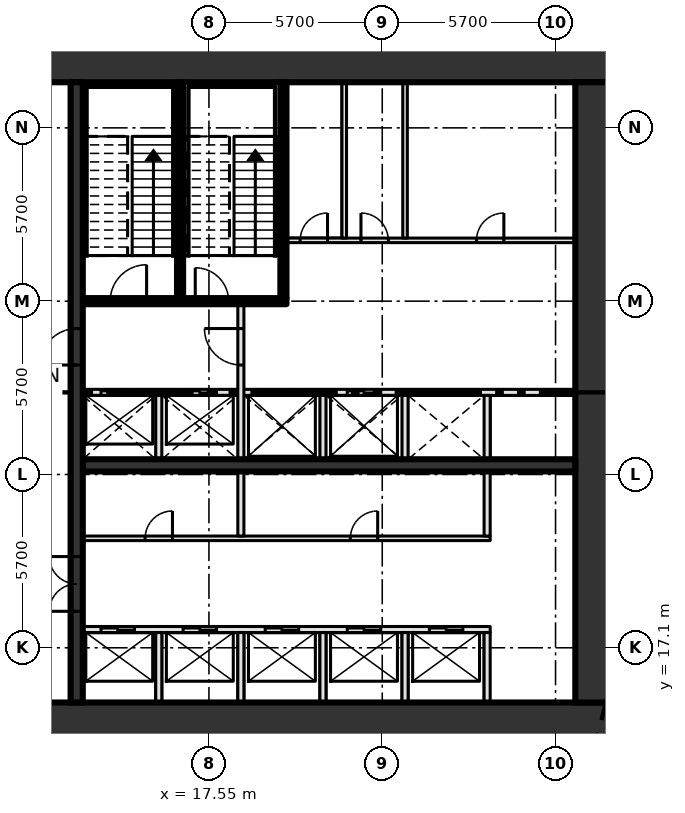
"""IFC4 building model, lengths in metres.
Left out: names, types, materials, properties, quantities, classifications, styles, units other than length and angle.
Written with IfcOpenShell. Run it as: python <this file> out.ifc"""

import sys

from ifc_helpers import new_model, si_unit, direction, frame, frame_2d, origin, place, context, subcontext, project, spatial, rectangle, extrude, element, fill, save


model = new_model("IFC4")
c1 = context("Model", 3, precision=1e-05, world=origin(), true_north=direction((0.0, 1.0)))
c2 = subcontext(c1, "Body", "Model", "MODEL_VIEW")
j1 = project(units=[si_unit("LENGTHUNIT", "METRE"), si_unit("PLANEANGLEUNIT", "RADIAN")], contexts=[c1])
p1 = place(None, origin())
s1 = spatial("IfcSite", under=j1, at=p1, CompositionType="ELEMENT")
p2 = place(p1, origin())
s2 = spatial("IfcBuilding", under=s1, at=p2, CompositionType="ELEMENT")
p3 = place(p2, frame((0.0, 0.0, 7.2)))
s3 = spatial("IfcBuildingStorey", under=s2, at=p3, CompositionType="ELEMENT", Elevation=7.2)
p4 = place(p3, frame((8.0, 14.7, -0.45), z_axis=(0.0, 0.0, 1.0), x_axis=(1.0, 0.0, 0.0)))
e1 = element("IfcWall", 1, at=p4, inside=s3, PredefinedType="SHEAR", context=c2, shape_type="SweptSolid", body=[
    extrude(rectangle(XDim=22.8, YDim=1.2, at=frame_2d((11.4, 0.0))), origin(), (0.0, 0.0, 1.0), 5.4),
])
p5 = place(p4, frame((2.3, 0.0, 0.45)))
e2 = element("IfcOpeningElement", 2, at=p5, cuts=e1, PredefinedType="OPENING", context=c2, shape_type="SweptSolid", body=[
    extrude(rectangle(XDim=1.8, YDim=2.1, at=frame_2d((0.9, 1.05))), frame((0.0, 0.61, 0.0), z_axis=(0.0, -1.0, 0.0), x_axis=(1.0, 0.0, 0.0)), (0.0, 0.0, 1.0), 1.22),
])
p6 = place(p3, frame((8.0, 36.3, -0.45), z_axis=(0.0, 0.0, 1.0), x_axis=(1.0, 0.0, 0.0)))
e3 = element("IfcWall", 3, at=p6, inside=s3, PredefinedType="SHEAR", context=c2, shape_type="SweptSolid", body=[
    extrude(rectangle(XDim=22.8, YDim=1.2, at=frame_2d((11.4, 0.0))), origin(), (0.0, 0.0, 1.0), 5.4),
])
p7 = place(p6, frame((2.3, 0.0, 0.45)))
e4 = element("IfcOpeningElement", 4, at=p7, cuts=e3, PredefinedType="OPENING", context=c2, shape_type="SweptSolid", body=[
    extrude(rectangle(XDim=1.8, YDim=2.1, at=frame_2d((0.9, 1.05))), frame((0.0, 0.61, 0.0), z_axis=(0.0, -1.0, 0.0), x_axis=(1.0, 0.0, 0.0)), (0.0, 0.0, 1.0), 1.22),
])
p8 = place(p3, frame((30.2, 15.3, -0.45), z_axis=(0.0, 0.0, 1.0), x_axis=(0.0, 1.0, 0.0)))
e5 = element("IfcWall", 5, at=p8, inside=s3, PredefinedType="SHEAR", context=c2, shape_type="SweptSolid", body=[
    extrude(rectangle(XDim=20.4, YDim=1.2, at=frame_2d((10.2, 0.0))), origin(), (0.0, 0.0, 1.0), 5.4),
])
p9 = place(p3, frame((13.4, 17.7, 0.0), z_axis=(0.0, 0.0, 1.0), x_axis=(1.0, 0.0, 0.0)))
e6 = element("IfcWall", 6, at=p9, inside=s3, PredefinedType="SOLIDWALL", context=c2, shape_type="SweptSolid", body=[
    extrude(rectangle(XDim=13.4, YDim=0.2, at=frame_2d((6.7, 0.0))), origin(), (0.0, 0.0, 1.0), 4.95),
])
p10 = place(p9, frame((0.6, 0.0, 0.0)))
e7 = element("IfcOpeningElement", 7, at=p10, cuts=e6, PredefinedType="OPENING", context=c2, shape_type="SweptSolid", body=[
    extrude(rectangle(XDim=1.1, YDim=2.1, at=frame_2d((0.55, 1.05))), frame((0.0, 0.11, 0.0), z_axis=(0.0, -1.0, 0.0), x_axis=(1.0, 0.0, 0.0)), (0.0, 0.0, 1.0), 0.22),
])
p11 = place(p9, frame((3.3, 0.0, 0.0)))
e8 = element("IfcOpeningElement", 8, at=p11, cuts=e6, PredefinedType="OPENING", context=c2, shape_type="SweptSolid", body=[
    extrude(rectangle(XDim=1.1, YDim=2.1, at=frame_2d((0.55, 1.05))), frame((0.0, 0.11, 0.0), z_axis=(0.0, -1.0, 0.0), x_axis=(1.0, 0.0, 0.0)), (0.0, 0.0, 1.0), 0.22),
])
p12 = place(p9, frame((6.0, 0.0, 0.0)))
e9 = element("IfcOpeningElement", 9, at=p12, cuts=e6, PredefinedType="OPENING", context=c2, shape_type="SweptSolid", body=[
    extrude(rectangle(XDim=1.1, YDim=2.1, at=frame_2d((0.55, 1.05))), frame((0.0, 0.11, 0.0), z_axis=(0.0, -1.0, 0.0), x_axis=(1.0, 0.0, 0.0)), (0.0, 0.0, 1.0), 0.22),
])
p13 = place(p9, frame((8.7, 0.0, 0.0)))
e10 = element("IfcOpeningElement", 10, at=p13, cuts=e6, PredefinedType="OPENING", context=c2, shape_type="SweptSolid", body=[
    extrude(rectangle(XDim=1.1, YDim=2.1, at=frame_2d((0.55, 1.05))), frame((0.0, 0.11, 0.0), z_axis=(0.0, -1.0, 0.0), x_axis=(1.0, 0.0, 0.0)), (0.0, 0.0, 1.0), 0.22),
])
p14 = place(p9, frame((11.4, 0.0, 0.0)))
e11 = element("IfcOpeningElement", 11, at=p14, cuts=e6, PredefinedType="OPENING", context=c2, shape_type="SweptSolid", body=[
    extrude(rectangle(XDim=1.1, YDim=2.1, at=frame_2d((0.55, 1.05))), frame((0.0, 0.11, 0.0), z_axis=(0.0, -1.0, 0.0), x_axis=(1.0, 0.0, 0.0)), (0.0, 0.0, 1.0), 0.22),
])
p15 = place(p3, frame((13.4, 20.7, 0.0), z_axis=(0.0, 0.0, 1.0), x_axis=(1.0, 0.0, 0.0)))
e12 = element("IfcWall", 12, at=p15, inside=s3, PredefinedType="PARTITIONING", context=c2, shape_type="SweptSolid", body=[
    extrude(rectangle(XDim=13.4, YDim=0.15, at=frame_2d((6.7, 0.0))), origin(), (0.0, 0.0, 1.0), 4.95),
])
p16 = place(p15, frame((2.05, 0.0, 0.0)))
e13 = element("IfcOpeningElement", 13, at=p16, cuts=e12, PredefinedType="OPENING", context=c2, shape_type="SweptSolid", body=[
    extrude(rectangle(XDim=0.9, YDim=2.1, at=frame_2d((0.45, 1.05))), frame((0.0, 0.085, 0.0), z_axis=(0.0, -1.0, 0.0), x_axis=(1.0, 0.0, 0.0)), (0.0, 0.0, 1.0), 0.17),
])
p17 = place(p15, frame((8.8, 0.0, 0.0)))
e14 = element("IfcOpeningElement", 14, at=p17, cuts=e12, PredefinedType="OPENING", context=c2, shape_type="SweptSolid", body=[
    extrude(rectangle(XDim=0.9, YDim=2.1, at=frame_2d((0.45, 1.05))), frame((0.0, 0.085, 0.0), z_axis=(0.0, -1.0, 0.0), x_axis=(1.0, 0.0, 0.0)), (0.0, 0.0, 1.0), 0.17),
])
p18 = place(p3, frame((13.4, 23.1, 0.0), z_axis=(0.0, 0.0, 1.0), x_axis=(1.0, 0.0, 0.0)))
e15 = element("IfcWall", 15, at=p18, inside=s3, PredefinedType="SHEAR", context=c2, shape_type="SweptSolid", body=[
    extrude(rectangle(XDim=16.2, YDim=0.4, at=frame_2d((8.1, 0.0))), origin(), (0.0, 0.0, 1.0), 4.95),
])
p19 = place(p3, frame((13.4, 25.5, 0.0), z_axis=(0.0, 0.0, 1.0), x_axis=(1.0, 0.0, 0.0)))
e16 = element("IfcWall", 16, at=p19, inside=s3, PredefinedType="SOLIDWALL", context=c2, shape_type="SweptSolid", body=[
    extrude(rectangle(XDim=16.2, YDim=0.2, at=frame_2d((8.1, 0.0))), origin(), (0.0, 0.0, 1.0), 4.95),
])
p20 = place(p19, frame((0.6, 0.0, 0.0)))
e17 = element("IfcOpeningElement", 17, at=p20, cuts=e16, PredefinedType="OPENING", context=c2, shape_type="SweptSolid", body=[
    extrude(rectangle(XDim=1.1, YDim=2.1, at=frame_2d((0.55, 1.05))), frame((0.0, 0.11, 0.0), z_axis=(0.0, -1.0, 0.0), x_axis=(1.0, 0.0, 0.0)), (0.0, 0.0, 1.0), 0.22),
])
p21 = place(p19, frame((3.3, 0.0, 0.0)))
e18 = element("IfcOpeningElement", 18, at=p21, cuts=e16, PredefinedType="OPENING", context=c2, shape_type="SweptSolid", body=[
    extrude(rectangle(XDim=1.1, YDim=2.1, at=frame_2d((0.55, 1.05))), frame((0.0, 0.11, 0.0), z_axis=(0.0, -1.0, 0.0), x_axis=(1.0, 0.0, 0.0)), (0.0, 0.0, 1.0), 0.22),
])
p22 = place(p19, frame((6.0, 0.0, 0.0)))
e19 = element("IfcOpeningElement", 19, at=p22, cuts=e16, PredefinedType="OPENING", context=c2, shape_type="SweptSolid", body=[
    extrude(rectangle(XDim=1.1, YDim=2.1, at=frame_2d((0.55, 1.05))), frame((0.0, 0.11, 0.0), z_axis=(0.0, -1.0, 0.0), x_axis=(1.0, 0.0, 0.0)), (0.0, 0.0, 1.0), 0.22),
])
p23 = place(p19, frame((8.7, 0.0, 0.0)))
e20 = element("IfcOpeningElement", 20, at=p23, cuts=e16, PredefinedType="OPENING", context=c2, shape_type="SweptSolid", body=[
    extrude(rectangle(XDim=1.1, YDim=2.1, at=frame_2d((0.55, 1.05))), frame((0.0, 0.11, 0.0), z_axis=(0.0, -1.0, 0.0), x_axis=(1.0, 0.0, 0.0)), (0.0, 0.0, 1.0), 0.22),
])
p24 = place(p3, frame((13.4, 28.5, 0.0), z_axis=(0.0, 0.0, 1.0), x_axis=(1.0, 0.0, 0.0)))
e21 = element("IfcWall", 21, at=p24, inside=s3, PredefinedType="SOLIDWALL", context=c2, shape_type="SweptSolid", body=[
    extrude(rectangle(XDim=6.7, YDim=0.2, at=frame_2d((3.35, 0.0))), origin(), (0.0, 0.0, 1.0), 4.95),
])
p25 = place(p24, frame((0.9, 0.0, 0.0)))
e22 = element("IfcOpeningElement", 22, at=p25, cuts=e21, PredefinedType="OPENING", context=c2, shape_type="SweptSolid", body=[
    extrude(rectangle(XDim=1.2, YDim=2.1, at=frame_2d((0.6, 1.05))), frame((0.0, 0.11, 0.0), z_axis=(0.0, -1.0, 0.0), x_axis=(1.0, 0.0, 0.0)), (0.0, 0.0, 1.0), 0.22),
])
p26 = place(p24, frame((3.7, 0.0, 0.0)))
e23 = element("IfcOpeningElement", 23, at=p26, cuts=e21, PredefinedType="OPENING", context=c2, shape_type="SweptSolid", body=[
    extrude(rectangle(XDim=1.1, YDim=2.1, at=frame_2d((0.55, 1.05))), frame((0.0, 0.11, 0.0), z_axis=(0.0, -1.0, 0.0), x_axis=(1.0, 0.0, 0.0)), (0.0, 0.0, 1.0), 0.22),
])
p27 = place(p3, frame((20.1, 30.5, 0.0), z_axis=(0.0, 0.0, 1.0), x_axis=(1.0, 0.0, 0.0)))
e24 = element("IfcWall", 24, at=p27, inside=s3, PredefinedType="PARTITIONING", context=c2, shape_type="SweptSolid", body=[
    extrude(rectangle(XDim=9.5, YDim=0.15, at=frame_2d((4.75, 0.0))), origin(), (0.0, 0.0, 1.0), 4.95),
])
p28 = place(p27, frame((0.45, 0.0, 0.0)))
e25 = element("IfcOpeningElement", 25, at=p28, cuts=e24, PredefinedType="OPENING", context=c2, shape_type="SweptSolid", body=[
    extrude(rectangle(XDim=0.9, YDim=2.1, at=frame_2d((0.45, 1.05))), frame((0.0, 0.085, 0.0), z_axis=(0.0, -1.0, 0.0), x_axis=(1.0, 0.0, 0.0)), (0.0, 0.0, 1.0), 0.17),
])
p29 = place(p27, frame((2.45, 0.0, 0.0)))
e26 = element("IfcOpeningElement", 26, at=p29, cuts=e24, PredefinedType="OPENING", context=c2, shape_type="SweptSolid", body=[
    extrude(rectangle(XDim=0.9, YDim=2.1, at=frame_2d((0.45, 1.05))), frame((0.0, 0.085, 0.0), z_axis=(0.0, -1.0, 0.0), x_axis=(1.0, 0.0, 0.0)), (0.0, 0.0, 1.0), 0.17),
])
p30 = place(p27, frame((6.25, 0.0, 0.0)))
e27 = element("IfcOpeningElement", 27, at=p30, cuts=e24, PredefinedType="OPENING", context=c2, shape_type="SweptSolid", body=[
    extrude(rectangle(XDim=0.9, YDim=2.1, at=frame_2d((0.45, 1.05))), frame((0.0, 0.085, 0.0), z_axis=(0.0, -1.0, 0.0), x_axis=(1.0, 0.0, 0.0)), (0.0, 0.0, 1.0), 0.17),
])
p31 = place(p3, frame((13.2, 15.3, 0.0), z_axis=(0.0, 0.0, 1.0), x_axis=(0.0, 1.0, 0.0)))
e28 = element("IfcWall", 28, at=p31, inside=s3, PredefinedType="SHEAR", context=c2, shape_type="SweptSolid", body=[
    extrude(rectangle(XDim=20.4, YDim=0.4, at=frame_2d((10.2, 0.0))), origin(), (0.0, 0.0, 1.0), 4.95),
])
p32 = place(p31, frame((3.0, 0.0, 0.0)))
e29 = element("IfcOpeningElement", 29, at=p32, cuts=e28, PredefinedType="OPENING", context=c2, shape_type="SweptSolid", body=[
    extrude(rectangle(XDim=1.8, YDim=2.1, at=frame_2d((0.9, 1.05))), frame((0.0, 0.21, 0.0), z_axis=(0.0, -1.0, 0.0), x_axis=(1.0, 0.0, 0.0)), (0.0, 0.0, 1.0), 0.42),
])
p33 = place(p31, frame((11.1, 0.0, 0.0)))
e30 = element("IfcOpeningElement", 30, at=p33, cuts=e28, PredefinedType="OPENING", context=c2, shape_type="SweptSolid", body=[
    extrude(rectangle(XDim=1.2, YDim=2.1, at=frame_2d((0.6, 1.05))), frame((0.0, 0.21, 0.0), z_axis=(0.0, -1.0, 0.0), x_axis=(1.0, 0.0, 0.0)), (0.0, 0.0, 1.0), 0.42),
])
p34 = place(p3, frame((15.9, 15.3, 0.0), z_axis=(0.0, 0.0, 1.0), x_axis=(0.0, 1.0, 0.0)))
e31 = element("IfcWall", 31, at=p34, inside=s3, PredefinedType="SOLIDWALL", context=c2, shape_type="SweptSolid", body=[
    extrude(rectangle(XDim=2.3, YDim=0.2, at=frame_2d((1.15, 0.0))), origin(), (0.0, 0.0, 1.0), 4.95),
])
p35 = place(p3, frame((15.9, 23.3, 0.0), z_axis=(0.0, 0.0, 1.0), x_axis=(0.0, 1.0, 0.0)))
e32 = element("IfcWall", 32, at=p35, inside=s3, PredefinedType="SOLIDWALL", context=c2, shape_type="SweptSolid", body=[
    extrude(rectangle(XDim=2.1, YDim=0.2, at=frame_2d((1.05, 0.0))), origin(), (0.0, 0.0, 1.0), 4.95),
])
p36 = place(p3, frame((16.6, 28.6, 0.0), z_axis=(0.0, 0.0, 1.0), x_axis=(0.0, 1.0, 0.0)))
e33 = element("IfcWall", 33, at=p36, inside=s3, PredefinedType="SOLIDWALL", context=c2, shape_type="SweptSolid", body=[
    extrude(rectangle(XDim=7.1, YDim=0.2, at=frame_2d((3.55, 0.0))), origin(), (0.0, 0.0, 1.0), 4.95),
])
p37 = place(p3, frame((18.6, 15.3, 0.0), z_axis=(0.0, 0.0, 1.0), x_axis=(0.0, 1.0, 0.0)))
e34 = element("IfcWall", 34, at=p37, inside=s3, PredefinedType="SOLIDWALL", context=c2, shape_type="SweptSolid", body=[
    extrude(rectangle(XDim=2.3, YDim=0.2, at=frame_2d((1.15, 0.0))), origin(), (0.0, 0.0, 1.0), 4.95),
])
p38 = place(p3, frame((18.6, 20.775, 0.0), z_axis=(0.0, 0.0, 1.0), x_axis=(0.0, 1.0, 0.0)))
e35 = element("IfcWall", 35, at=p38, inside=s3, PredefinedType="SOLIDWALL", context=c2, shape_type="SweptSolid", body=[
    extrude(rectangle(XDim=7.625, YDim=0.2, at=frame_2d((3.812, 0.0))), origin(), (0.0, 0.0, 1.0), 4.95),
])
p39 = place(p38, frame((5.625, 0.0, 0.0)))
e36 = element("IfcOpeningElement", 36, at=p39, cuts=e35, PredefinedType="OPENING", context=c2, shape_type="SweptSolid", body=[
    extrude(rectangle(XDim=1.2, YDim=2.1, at=frame_2d((0.6, 1.05))), frame((0.0, 0.11, 0.0), z_axis=(0.0, -1.0, 0.0), x_axis=(1.0, 0.0, 0.0)), (0.0, 0.0, 1.0), 0.22),
])
p40 = place(p3, frame((20.0, 28.6, 0.0), z_axis=(0.0, 0.0, 1.0), x_axis=(0.0, 1.0, 0.0)))
e37 = element("IfcWall", 37, at=p40, inside=s3, PredefinedType="SOLIDWALL", context=c2, shape_type="SweptSolid", body=[
    extrude(rectangle(XDim=7.1, YDim=0.2, at=frame_2d((3.55, 0.0))), origin(), (0.0, 0.0, 1.0), 4.95),
])
p41 = place(p3, frame((21.3, 15.3, 0.0), z_axis=(0.0, 0.0, 1.0), x_axis=(0.0, 1.0, 0.0)))
e38 = element("IfcWall", 38, at=p41, inside=s3, PredefinedType="SOLIDWALL", context=c2, shape_type="SweptSolid", body=[
    extrude(rectangle(XDim=2.3, YDim=0.2, at=frame_2d((1.15, 0.0))), origin(), (0.0, 0.0, 1.0), 4.95),
])
p42 = place(p3, frame((21.3, 23.3, 0.0), z_axis=(0.0, 0.0, 1.0), x_axis=(0.0, 1.0, 0.0)))
e39 = element("IfcWall", 39, at=p42, inside=s3, PredefinedType="SOLIDWALL", context=c2, shape_type="SweptSolid", body=[
    extrude(rectangle(XDim=2.1, YDim=0.2, at=frame_2d((1.05, 0.0))), origin(), (0.0, 0.0, 1.0), 4.95),
])
p43 = place(p3, frame((22.0, 30.575, 0.0), z_axis=(0.0, 0.0, 1.0), x_axis=(0.0, 1.0, 0.0)))
e40 = element("IfcWall", 40, at=p43, inside=s3, PredefinedType="PARTITIONING", context=c2, shape_type="SweptSolid", body=[
    extrude(rectangle(XDim=5.125, YDim=0.15, at=frame_2d((2.562, 0.0))), origin(), (0.0, 0.0, 1.0), 4.95),
])
p44 = place(p3, frame((24.0, 15.3, 0.0), z_axis=(0.0, 0.0, 1.0), x_axis=(0.0, 1.0, 0.0)))
e41 = element("IfcWall", 41, at=p44, inside=s3, PredefinedType="SOLIDWALL", context=c2, shape_type="SweptSolid", body=[
    extrude(rectangle(XDim=2.3, YDim=0.2, at=frame_2d((1.15, 0.0))), origin(), (0.0, 0.0, 1.0), 4.95),
])
p45 = place(p3, frame((24.0, 23.3, 0.0), z_axis=(0.0, 0.0, 1.0), x_axis=(0.0, 1.0, 0.0)))
e42 = element("IfcWall", 42, at=p45, inside=s3, PredefinedType="SOLIDWALL", context=c2, shape_type="SweptSolid", body=[
    extrude(rectangle(XDim=2.1, YDim=0.2, at=frame_2d((1.05, 0.0))), origin(), (0.0, 0.0, 1.0), 4.95),
])
p46 = place(p3, frame((24.0, 30.575, 0.0), z_axis=(0.0, 0.0, 1.0), x_axis=(0.0, 1.0, 0.0)))
e43 = element("IfcWall", 43, at=p46, inside=s3, PredefinedType="PARTITIONING", context=c2, shape_type="SweptSolid", body=[
    extrude(rectangle(XDim=5.125, YDim=0.15, at=frame_2d((2.562, 0.0))), origin(), (0.0, 0.0, 1.0), 4.95),
])
p47 = place(p3, frame((26.7, 15.3, 0.0), z_axis=(0.0, 0.0, 1.0), x_axis=(0.0, 1.0, 0.0)))
e44 = element("IfcWall", 44, at=p47, inside=s3, PredefinedType="SOLIDWALL", context=c2, shape_type="SweptSolid", body=[
    extrude(rectangle(XDim=2.3, YDim=0.2, at=frame_2d((1.15, 0.0))), origin(), (0.0, 0.0, 1.0), 4.95),
])
p48 = place(p3, frame((26.7, 20.775, 0.0), z_axis=(0.0, 0.0, 1.0), x_axis=(0.0, 1.0, 0.0)))
e45 = element("IfcWall", 45, at=p48, inside=s3, PredefinedType="SOLIDWALL", context=c2, shape_type="SweptSolid", body=[
    extrude(rectangle(XDim=4.625, YDim=0.2, at=frame_2d((2.312, 0.0))), origin(), (0.0, 0.0, 1.0), 4.95),
])
p49 = place(p10, origin())
e46 = element("IfcDoor", 46, at=p49, inside=s3, OperationType="SLIDING_TO_LEFT", PredefinedType="DOOR", context=c2, shape_type="SweptSolid", body=[
    extrude(rectangle(XDim=1.1, YDim=2.1, at=frame_2d((0.55, 1.05))), frame((0.0, 0.025, 0.0), z_axis=(0.0, -1.0, 0.0), x_axis=(1.0, 0.0, 0.0)), (0.0, 0.0, 1.0), 0.05),
])
fill(e7, e46)
p50 = place(p11, origin())
e47 = element("IfcDoor", 47, at=p50, inside=s3, OperationType="SLIDING_TO_LEFT", PredefinedType="DOOR", context=c2, shape_type="SweptSolid", body=[
    extrude(rectangle(XDim=1.1, YDim=2.1, at=frame_2d((0.55, 1.05))), frame((0.0, 0.025, 0.0), z_axis=(0.0, -1.0, 0.0), x_axis=(1.0, 0.0, 0.0)), (0.0, 0.0, 1.0), 0.05),
])
fill(e8, e47)
p51 = place(p12, origin())
e48 = element("IfcDoor", 48, at=p51, inside=s3, OperationType="SLIDING_TO_LEFT", PredefinedType="DOOR", context=c2, shape_type="SweptSolid", body=[
    extrude(rectangle(XDim=1.1, YDim=2.1, at=frame_2d((0.55, 1.05))), frame((0.0, 0.025, 0.0), z_axis=(0.0, -1.0, 0.0), x_axis=(1.0, 0.0, 0.0)), (0.0, 0.0, 1.0), 0.05),
])
fill(e9, e48)
p52 = place(p13, origin())
e49 = element("IfcDoor", 49, at=p52, inside=s3, OperationType="SLIDING_TO_LEFT", PredefinedType="DOOR", context=c2, shape_type="SweptSolid", body=[
    extrude(rectangle(XDim=1.1, YDim=2.1, at=frame_2d((0.55, 1.05))), frame((0.0, 0.025, 0.0), z_axis=(0.0, -1.0, 0.0), x_axis=(1.0, 0.0, 0.0)), (0.0, 0.0, 1.0), 0.05),
])
fill(e10, e49)
p53 = place(p14, origin())
e50 = element("IfcDoor", 50, at=p53, inside=s3, OperationType="SLIDING_TO_LEFT", PredefinedType="DOOR", context=c2, shape_type="SweptSolid", body=[
    extrude(rectangle(XDim=1.1, YDim=2.1, at=frame_2d((0.55, 1.05))), frame((0.0, 0.025, 0.0), z_axis=(0.0, -1.0, 0.0), x_axis=(1.0, 0.0, 0.0)), (0.0, 0.0, 1.0), 0.05),
])
fill(e11, e50)
p54 = place(p20, origin())
e51 = element("IfcDoor", 51, at=p54, inside=s3, OperationType="SLIDING_TO_LEFT", PredefinedType="DOOR", context=c2, shape_type="SweptSolid", body=[
    extrude(rectangle(XDim=1.1, YDim=2.1, at=frame_2d((0.55, 1.05))), frame((0.0, 0.025, 0.0), z_axis=(0.0, -1.0, 0.0), x_axis=(1.0, 0.0, 0.0)), (0.0, 0.0, 1.0), 0.05),
])
fill(e17, e51)
p55 = place(p21, origin())
e52 = element("IfcDoor", 52, at=p55, inside=s3, OperationType="SLIDING_TO_LEFT", PredefinedType="DOOR", context=c2, shape_type="SweptSolid", body=[
    extrude(rectangle(XDim=1.1, YDim=2.1, at=frame_2d((0.55, 1.05))), frame((0.0, 0.025, 0.0), z_axis=(0.0, -1.0, 0.0), x_axis=(1.0, 0.0, 0.0)), (0.0, 0.0, 1.0), 0.05),
])
fill(e18, e52)
p56 = place(p22, origin())
e53 = element("IfcDoor", 53, at=p56, inside=s3, OperationType="SLIDING_TO_LEFT", PredefinedType="DOOR", context=c2, shape_type="SweptSolid", body=[
    extrude(rectangle(XDim=1.1, YDim=2.1, at=frame_2d((0.55, 1.05))), frame((0.0, 0.025, 0.0), z_axis=(0.0, -1.0, 0.0), x_axis=(1.0, 0.0, 0.0)), (0.0, 0.0, 1.0), 0.05),
])
fill(e19, e53)
p57 = place(p23, origin())
e54 = element("IfcDoor", 54, at=p57, inside=s3, OperationType="SLIDING_TO_LEFT", PredefinedType="DOOR", context=c2, shape_type="SweptSolid", body=[
    extrude(rectangle(XDim=1.1, YDim=2.1, at=frame_2d((0.55, 1.05))), frame((0.0, 0.025, 0.0), z_axis=(0.0, -1.0, 0.0), x_axis=(1.0, 0.0, 0.0)), (0.0, 0.0, 1.0), 0.05),
])
fill(e20, e54)
p58 = place(p16, origin())
e55 = element("IfcDoor", 55, at=p58, inside=s3, OperationType="SINGLE_SWING_RIGHT", PredefinedType="DOOR", context=c2, shape_type="SweptSolid", body=[
    extrude(rectangle(XDim=0.9, YDim=2.1, at=frame_2d((0.45, 1.05))), frame((0.0, 0.025, 0.0), z_axis=(0.0, -1.0, 0.0), x_axis=(1.0, 0.0, 0.0)), (0.0, 0.0, 1.0), 0.05),
])
fill(e13, e55)
p59 = place(p17, origin())
e56 = element("IfcDoor", 56, at=p59, inside=s3, OperationType="SINGLE_SWING_RIGHT", PredefinedType="DOOR", context=c2, shape_type="SweptSolid", body=[
    extrude(rectangle(XDim=0.9, YDim=2.1, at=frame_2d((0.45, 1.05))), frame((0.0, 0.025, 0.0), z_axis=(0.0, -1.0, 0.0), x_axis=(1.0, 0.0, 0.0)), (0.0, 0.0, 1.0), 0.05),
])
fill(e14, e56)
p60 = place(p28, origin())
e57 = element("IfcDoor", 57, at=p60, inside=s3, OperationType="SINGLE_SWING_RIGHT", PredefinedType="DOOR", context=c2, shape_type="SweptSolid", body=[
    extrude(rectangle(XDim=0.9, YDim=2.1, at=frame_2d((0.45, 1.05))), frame((0.0, 0.025, 0.0), z_axis=(0.0, -1.0, 0.0), x_axis=(1.0, 0.0, 0.0)), (0.0, 0.0, 1.0), 0.05),
])
fill(e25, e57)
p61 = place(p29, origin())
e58 = element("IfcDoor", 58, at=p61, inside=s3, OperationType="SINGLE_SWING_LEFT", PredefinedType="DOOR", context=c2, shape_type="SweptSolid", body=[
    extrude(rectangle(XDim=0.9, YDim=2.1, at=frame_2d((0.45, 1.05))), frame((0.0, 0.025, 0.0), z_axis=(0.0, -1.0, 0.0), x_axis=(1.0, 0.0, 0.0)), (0.0, 0.0, 1.0), 0.05),
])
fill(e26, e58)
p62 = place(p30, origin())
e59 = element("IfcDoor", 59, at=p62, inside=s3, OperationType="SINGLE_SWING_RIGHT", PredefinedType="DOOR", context=c2, shape_type="SweptSolid", body=[
    extrude(rectangle(XDim=0.9, YDim=2.1, at=frame_2d((0.45, 1.05))), frame((0.0, 0.025, 0.0), z_axis=(0.0, -1.0, 0.0), x_axis=(1.0, 0.0, 0.0)), (0.0, 0.0, 1.0), 0.05),
])
fill(e27, e59)
p63 = place(p25, origin())
e60 = element("IfcDoor", 60, at=p63, inside=s3, OperationType="SINGLE_SWING_RIGHT", PredefinedType="DOOR", context=c2, shape_type="SweptSolid", body=[
    extrude(rectangle(XDim=1.2, YDim=2.1, at=frame_2d((0.6, 1.05))), frame((0.0, 0.025, 0.0), z_axis=(0.0, -1.0, 0.0), x_axis=(1.0, 0.0, 0.0)), (0.0, 0.0, 1.0), 0.05),
])
fill(e22, e60)
p64 = place(p26, origin())
e61 = element("IfcDoor", 61, at=p64, inside=s3, OperationType="SINGLE_SWING_LEFT", PredefinedType="DOOR", context=c2, shape_type="SweptSolid", body=[
    extrude(rectangle(XDim=1.1, YDim=2.1, at=frame_2d((0.55, 1.05))), frame((0.0, 0.025, 0.0), z_axis=(0.0, -1.0, 0.0), x_axis=(1.0, 0.0, 0.0)), (0.0, 0.0, 1.0), 0.05),
])
fill(e23, e61)
p65 = place(p32, origin())
e62 = element("IfcDoor", 62, at=p65, inside=s3, OperationType="DOUBLE_DOOR_SINGLE_SWING", PredefinedType="DOOR", context=c2, shape_type="SweptSolid", body=[
    extrude(rectangle(XDim=1.8, YDim=2.1, at=frame_2d((0.9, 1.05))), frame((0.0, 0.025, 0.0), z_axis=(0.0, -1.0, 0.0), x_axis=(1.0, 0.0, 0.0)), (0.0, 0.0, 1.0), 0.05),
])
fill(e29, e62)
p66 = place(p33, origin())
e63 = element("IfcDoor", 63, at=p66, inside=s3, OperationType="SINGLE_SWING_LEFT", PredefinedType="DOOR", context=c2, shape_type="SweptSolid", body=[
    extrude(rectangle(XDim=1.2, YDim=2.1, at=frame_2d((0.6, 1.05))), frame((0.0, 0.025, 0.0), z_axis=(0.0, -1.0, 0.0), x_axis=(1.0, 0.0, 0.0)), (0.0, 0.0, 1.0), 0.05),
])
fill(e30, e63)
p67 = place(p39, origin())
e64 = element("IfcDoor", 64, at=p67, inside=s3, OperationType="SINGLE_SWING_RIGHT", PredefinedType="DOOR", context=c2, shape_type="SweptSolid", body=[
    extrude(rectangle(XDim=1.2, YDim=2.1, at=frame_2d((0.6, 1.05))), frame((0.0, 0.025, 0.0), z_axis=(0.0, -1.0, 0.0), x_axis=(1.0, 0.0, 0.0)), (0.0, 0.0, 1.0), 0.05),
])
fill(e36, e64)
save(model, sys.argv[1])
